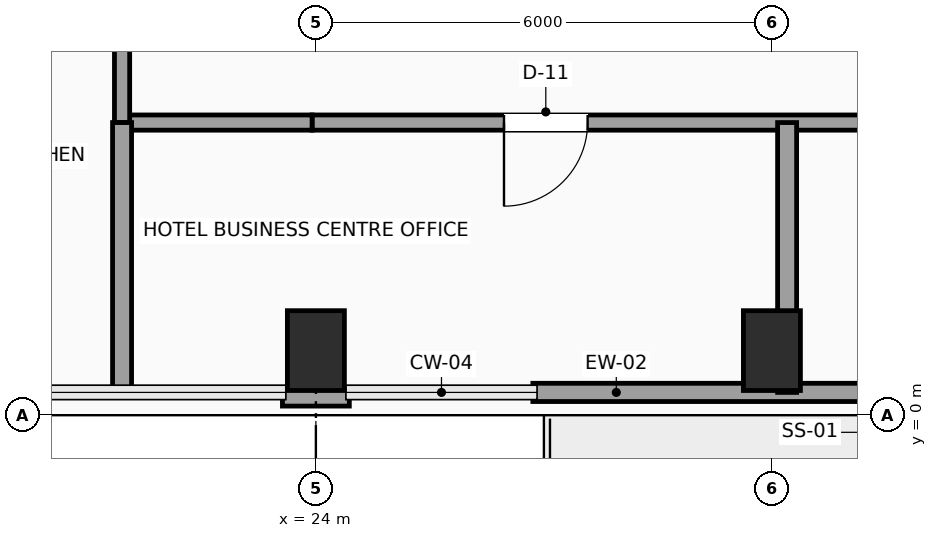
"""IFC4 building model, lengths in metres.
Left out: names, types, materials, properties, quantities, classifications, styles, units other than length and angle.
Written with IfcOpenShell. Run it as: python <this file> out.ifc"""

import sys

from ifc_helpers import new_model, si_unit, direction, frame, frame_2d, origin, origin_2d, place, context, subcontext, project, spatial, rectangle, extrude, element, fill, save


model = new_model("IFC4")
c1 = context("Model", 3, precision=1e-05, world=origin(), true_north=direction((0.0, 1.0)))
c2 = subcontext(c1, "Body", "Model", "MODEL_VIEW")
j1 = project(units=[si_unit("LENGTHUNIT", "METRE"), si_unit("PLANEANGLEUNIT", "RADIAN")], contexts=[c1])
p1 = place(None, origin())
s1 = spatial("IfcSite", under=j1, at=p1, CompositionType="ELEMENT")
p2 = place(p1, origin())
s2 = spatial("IfcBuilding", under=s1, at=p2, CompositionType="ELEMENT")
p3 = place(p2, frame((0.0, 0.0, 184.2)))
s3 = spatial("IfcBuildingStorey", under=s2, at=p3, CompositionType="ELEMENT", Elevation=184.2)
for number, where, z_axis, x_axis in (
    (1, (24.0, 0.85, 0.0), (0.0, 0.0, 1.0), (1.0, 0.0, 0.0)),
    (2, (30.0, 0.85, 0.0), (0.0, 0.0, 1.0), (1.0, 0.0, 0.0)),
):
    element("IfcColumn", number, at=place(p3, frame(where, z_axis=z_axis, x_axis=x_axis)), inside=s3, PredefinedType="COLUMN", context=c2, shape_type="SweptSolid", body=[
        extrude(rectangle(XDim=0.75, YDim=1.05, at=origin_2d()), origin(), (0.0, 0.0, 1.0), 3.75),
    ])
p4 = place(p3, frame((36.145, 0.3, 0.0), z_axis=(0.0, 0.0, 1.0), x_axis=(-1.0, 0.0, 0.0)))
e3 = element("IfcWall", 3, at=p4, inside=s3, PredefinedType="SOLIDWALL", context=c2, shape_type="SweptSolid", body=[
    extrude(rectangle(XDim=9.29, YDim=0.24, at=frame_2d((4.645, 0.0))), origin(), (0.0, 0.0, 1.0), 3.54),
])
p5 = place(p4, frame((3.945, 0.0, 0.0)))
e4 = element("IfcOpeningElement", 4, at=p5, cuts=e3, PredefinedType="OPENING", context=c2, shape_type="SweptSolid", body=[
    extrude(rectangle(XDim=1.05, YDim=2.2, at=frame_2d((0.525, 1.1))), frame((0.0, 0.13, 0.0), z_axis=(0.0, -1.0, 0.0), x_axis=(1.0, 0.0, 0.0)), (0.0, 0.0, 1.0), 0.26),
])
p6 = place(p3, frame((24.44, 0.24, 0.0), z_axis=(0.0, 0.0, 1.0), x_axis=(-1.0, 0.0, 0.0)))
e5 = element("IfcWall", 5, at=p6, inside=s3, PredefinedType="SOLIDWALL", context=c2, shape_type="SweptSolid", body=[
    extrude(rectangle(XDim=0.88, YDim=0.24, at=frame_2d((0.44, 0.0))), origin(), (0.0, 0.0, 1.0), 3.54),
])
p7 = place(p3, frame((36.35, 3.85, 0.0), z_axis=(0.0, 0.0, 1.0), x_axis=(-1.0, 0.0, 0.0)))
e6 = element("IfcWall", 6, at=p7, inside=s3, PredefinedType="SOLIDWALL", context=c2, shape_type="SweptSolid", body=[
    extrude(rectangle(XDim=12.4, YDim=0.2, at=frame_2d((6.2, 0.0))), origin(), (0.0, 0.0, 1.0), 3.54),
])
p8 = place(p7, frame((8.775, 0.0, 0.0)))
e7 = element("IfcOpeningElement", 7, at=p8, cuts=e6, PredefinedType="OPENING", context=c2, shape_type="SweptSolid", body=[
    extrude(rectangle(XDim=1.1, YDim=2.25, at=frame_2d((0.55, 1.125))), frame((0.0, 0.11, 0.0), z_axis=(0.0, -1.0, 0.0), x_axis=(1.0, 0.0, 0.0)), (0.0, 0.0, 1.0), 0.22),
])
p9 = place(p3, frame((23.95, 3.85, 0.0), z_axis=(0.0, 0.0, 1.0), x_axis=(-1.0, 0.0, 0.0)))
e8 = element("IfcWall", 8, at=p9, inside=s3, PredefinedType="SOLIDWALL", context=c2, shape_type="SweptSolid", body=[
    extrude(rectangle(XDim=2.5, YDim=0.2, at=frame_2d((1.25, 0.0))), origin(), (0.0, 0.0, 1.0), 3.54),
])
p10 = place(p3, frame((21.45, 3.85, 0.0), z_axis=(0.0, 0.0, 1.0), x_axis=(0.0, 1.0, 0.0)))
e9 = element("IfcWall", 9, at=p10, inside=s3, PredefinedType="SOLIDWALL", context=c2, shape_type="SweptSolid", body=[
    extrude(rectangle(XDim=1.95, YDim=0.2, at=frame_2d((0.975, 0.0))), origin(), (0.0, 0.0, 1.0), 3.54),
])
for number, where, z_axis, x_axis in (
    (10, (21.45, 0.3, 0.0), (0.0, 0.0, 1.0), (0.0, 1.0, 0.0)),
    (11, (30.2, 0.3, 0.0), (0.0, 0.0, 1.0), (0.0, 1.0, 0.0)),
):
    element("IfcWall", number, at=place(p3, frame(where, z_axis=z_axis, x_axis=x_axis)), inside=s3, PredefinedType="PARTITIONING", context=c2, shape_type="SweptSolid", body=[
        extrude(rectangle(XDim=3.55, YDim=0.25, at=frame_2d((1.775, 0.0))), origin(), (0.0, 0.0, 1.0), 3.54),
    ])
p11 = place(p8, origin())
e12 = element("IfcDoor", 12, at=p11, inside=s3, OperationType="SINGLE_SWING_RIGHT", PredefinedType="DOOR", context=c2, shape_type="SweptSolid", body=[
    extrude(rectangle(XDim=1.1, YDim=2.25, at=frame_2d((0.55, 1.125))), frame((0.0, 0.025, 0.0), z_axis=(0.0, -1.0, 0.0), x_axis=(1.0, 0.0, 0.0)), (0.0, 0.0, 1.0), 0.05),
])
fill(e7, e12)
save(model, sys.argv[1])
